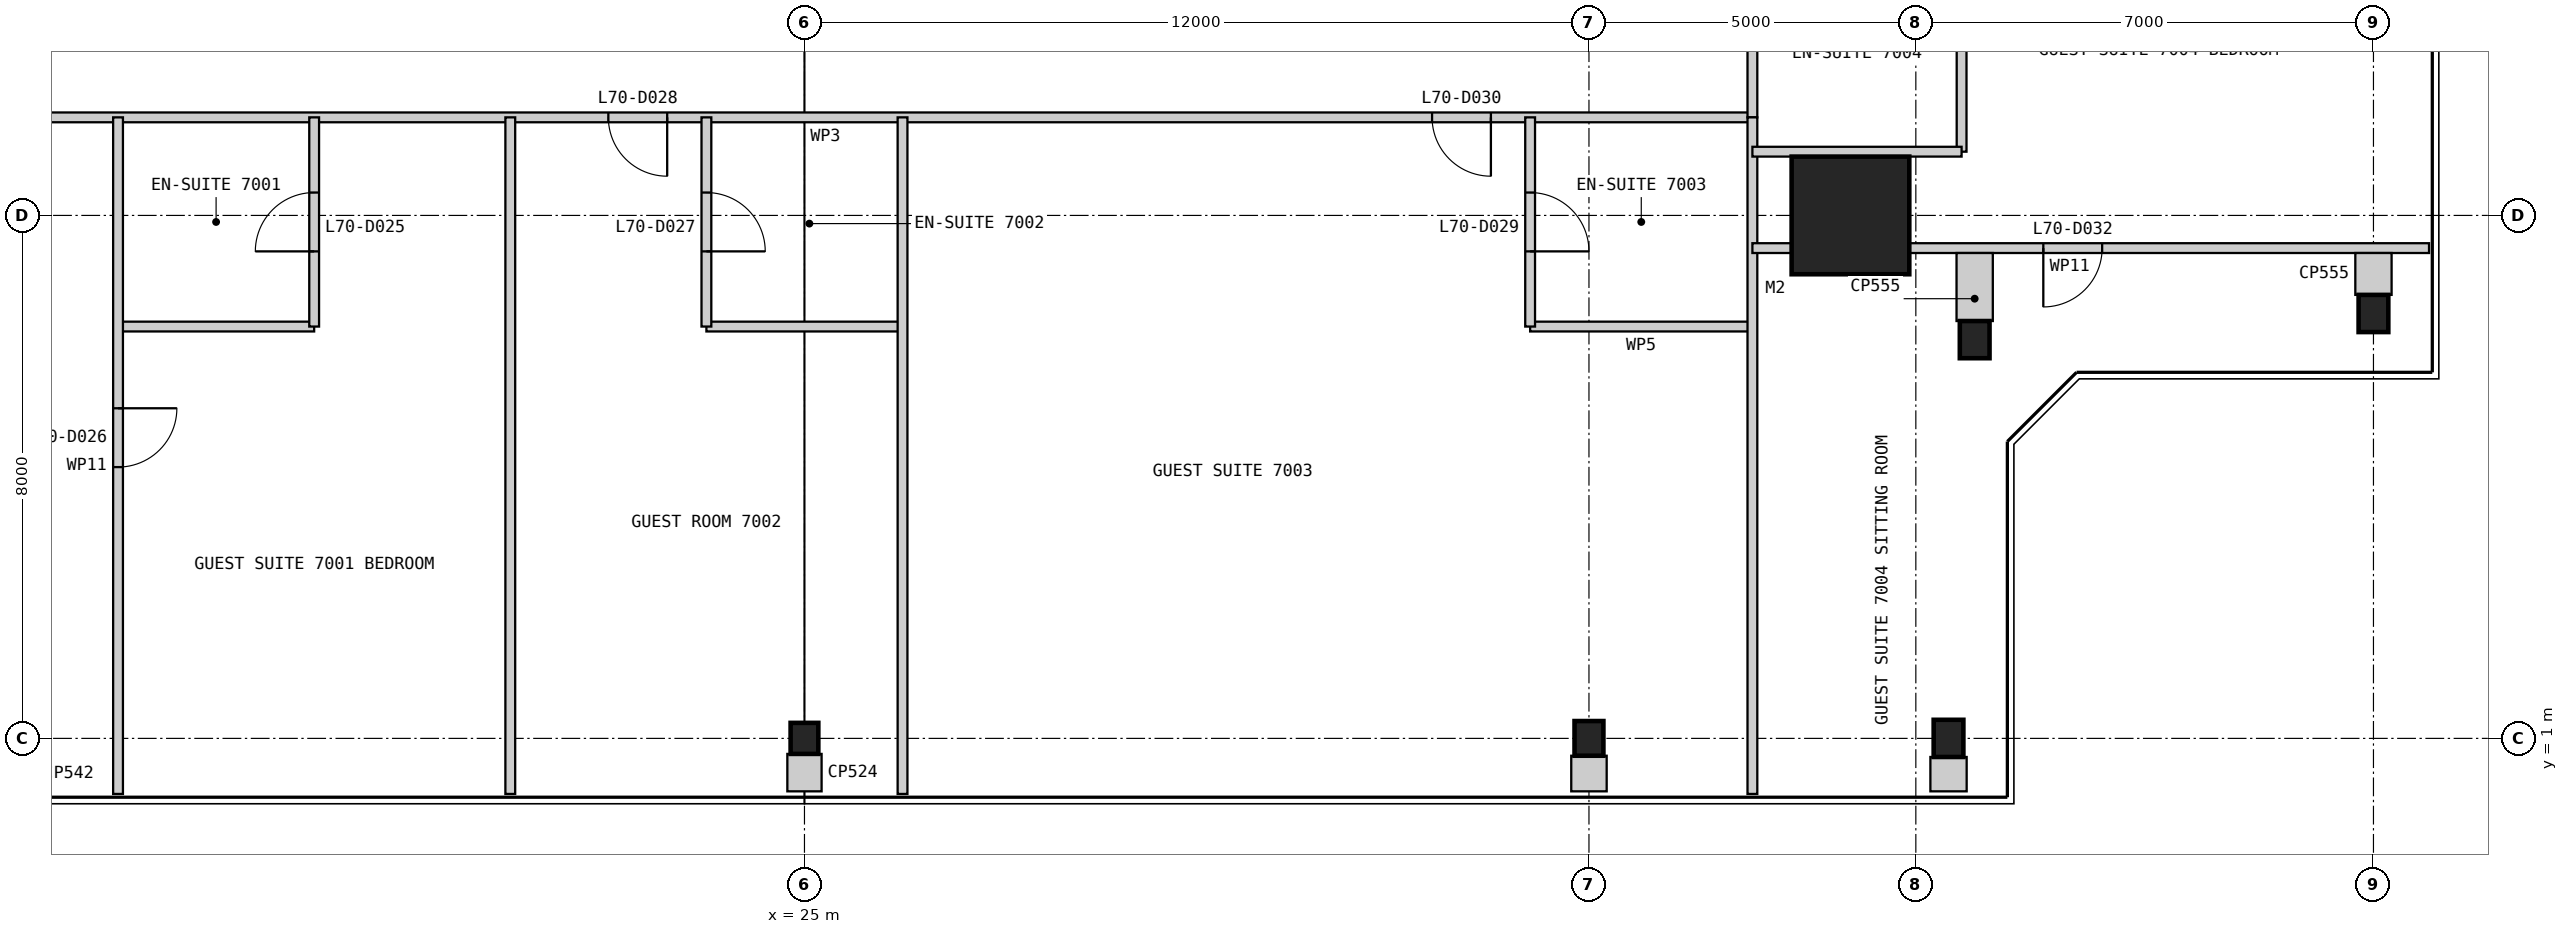
"""IFC4 building model, lengths in metres.
Left out: names, types, materials, properties, quantities, classifications, styles, units other than length and angle.
Written with IfcOpenShell. Run it as: python <this file> out.ifc"""

import sys

from ifc_helpers import new_model, si_unit, direction, frame, frame_2d, origin, origin_2d, place, context, subcontext, project, spatial, rectangle, i_section, extrude, element, fill, save


model = new_model("IFC4")
c1 = context("Model", 3, precision=1e-05, world=origin(), true_north=direction((0.0, 1.0)))
c2 = subcontext(c1, "Body", "Model", "MODEL_VIEW")
j1 = project(units=[si_unit("LENGTHUNIT", "METRE"), si_unit("PLANEANGLEUNIT", "RADIAN")], contexts=[c1])
p1 = place(None, origin())
s1 = spatial("IfcSite", under=j1, at=p1, CompositionType="ELEMENT")
p2 = place(p1, origin())
s2 = spatial("IfcBuilding", under=s1, at=p2, CompositionType="ELEMENT")
p3 = place(p2, frame((0.0, 0.0, 290.0)))
s3 = spatial("IfcBuildingStorey", under=s2, at=p3, CompositionType="ELEMENT", Elevation=290.0)
p4 = place(p3, frame((41.0, 9.0, 0.0), z_axis=(0.0, 0.0, 1.0), x_axis=(1.0, 0.0, 0.0)))
e1 = element("IfcColumn", 1, at=p4, inside=s3, PredefinedType="COLUMN", context=c2, shape_type="SweptSolid", body=[
    extrude(rectangle(XDim=1.8, YDim=1.8, at=origin_2d()), origin(), (0.0, 0.0, 1.0), 3.4),
])
p5 = place(p3, frame((25.0, 1.0, 0.0), z_axis=(0.0, 0.0, 1.0), x_axis=(1.0, 0.0, 0.0)))
e2 = element("IfcColumn", 2, at=p5, inside=s3, PredefinedType="COLUMN", context=c2, shape_type="SweptSolid", body=[
    extrude(i_section(OverallWidth=0.424, OverallDepth=0.475, WebThickness=0.048, FlangeThickness=0.077, at=origin_2d()), origin(), (0.0, 0.0, 1.0), 3.4),
])
p6 = place(p3, frame((37.0, 1.0, 0.0), z_axis=(0.0, 0.0, 1.0), x_axis=(1.0, 0.0, 0.0)))
e3 = element("IfcColumn", 3, at=p6, inside=s3, PredefinedType="COLUMN", context=c2, shape_type="SweptSolid", body=[
    extrude(i_section(OverallWidth=0.442, OverallDepth=0.531, WebThickness=0.066, FlangeThickness=0.106, at=origin_2d()), origin(), (0.0, 0.0, 1.0), 3.4),
])
for number, where, z_axis, x_axis in (
    (4, (42.5, 1.0, 0.0), (0.0, 0.0, 1.0), (1.0, 0.0, 0.0)),
    (5, (42.9, 7.1, 0.0), (0.0, 0.0, 1.0), (1.0, 0.0, 0.0)),
    (6, (49.0, 7.5, 0.0), (0.0, 0.0, 1.0), (1.0, 0.0, 0.0)),
):
    element("IfcColumn", number, at=place(p3, frame(where, z_axis=z_axis, x_axis=x_axis)), inside=s3, PredefinedType="COLUMN", context=c2, shape_type="SweptSolid", body=[
        extrude(i_section(OverallWidth=0.455, OverallDepth=0.569, WebThickness=0.078, FlangeThickness=0.125, at=origin_2d()), origin(), (0.0, 0.0, 1.0), 3.4),
    ])
p7 = place(p3, frame((10.5, 10.5, 0.0), z_axis=(0.0, 0.0, 1.0), x_axis=(1.0, 0.0, 0.0)))
e7 = element("IfcWall", 7, at=p7, inside=s3, PredefinedType="PARTITIONING", context=c2, shape_type="SweptSolid", body=[
    extrude(rectangle(XDim=29.0, YDim=0.15, at=frame_2d((14.5, 0.0))), origin(), (0.0, 0.0, 1.0), 3.25),
])
p8 = place(p7, frame((1.85, 0.0, 0.0)))
e8 = element("IfcOpeningElement", 8, at=p8, cuts=e7, PredefinedType="OPENING", context=c2, shape_type="SweptSolid", body=[
    extrude(rectangle(XDim=0.9, YDim=2.1, at=frame_2d((0.45, 1.05))), frame((0.0, 0.085, 0.0), z_axis=(0.0, -1.0, 0.0), x_axis=(1.0, 0.0, 0.0)), (0.0, 0.0, 1.0), 0.17),
])
p9 = place(p7, frame((11.5, 0.0, 0.0)))
e9 = element("IfcOpeningElement", 9, at=p9, cuts=e7, PredefinedType="OPENING", context=c2, shape_type="SweptSolid", body=[
    extrude(rectangle(XDim=0.9, YDim=2.1, at=frame_2d((0.45, 1.05))), frame((0.0, 0.085, 0.0), z_axis=(0.0, -1.0, 0.0), x_axis=(1.0, 0.0, 0.0)), (0.0, 0.0, 1.0), 0.17),
])
p10 = place(p7, frame((24.1, 0.0, 0.0)))
e10 = element("IfcOpeningElement", 10, at=p10, cuts=e7, PredefinedType="OPENING", context=c2, shape_type="SweptSolid", body=[
    extrude(rectangle(XDim=0.9, YDim=2.1, at=frame_2d((0.45, 1.05))), frame((0.0, 0.085, 0.0), z_axis=(0.0, -1.0, 0.0), x_axis=(1.0, 0.0, 0.0)), (0.0, 0.0, 1.0), 0.17),
])
p11 = place(p3, frame((14.5, 7.3, 0.0), z_axis=(0.0, 0.0, 1.0), x_axis=(1.0, 0.0, 0.0)))
e11 = element("IfcWall", 11, at=p11, inside=s3, PredefinedType="PARTITIONING", context=c2, shape_type="SweptSolid", body=[
    extrude(rectangle(XDim=3.0, YDim=0.15, at=frame_2d((1.5, 0.0))), origin(), (0.0, 0.0, 1.0), 3.25),
])
p12 = place(p3, frame((17.5, 7.3, 0.0), z_axis=(0.0, 0.0, 1.0), x_axis=(0.0, 1.0, 0.0)))
e12 = element("IfcWall", 12, at=p12, inside=s3, PredefinedType="PARTITIONING", context=c2, shape_type="SweptSolid", body=[
    extrude(rectangle(XDim=3.2, YDim=0.15, at=frame_2d((1.6, 0.0))), origin(), (0.0, 0.0, 1.0), 3.25),
])
p13 = place(p12, frame((1.15, 0.0, 0.0)))
e13 = element("IfcOpeningElement", 13, at=p13, cuts=e12, PredefinedType="OPENING", context=c2, shape_type="SweptSolid", body=[
    extrude(rectangle(XDim=0.9, YDim=2.1, at=frame_2d((0.45, 1.05))), frame((0.0, 0.085, 0.0), z_axis=(0.0, -1.0, 0.0), x_axis=(1.0, 0.0, 0.0)), (0.0, 0.0, 1.0), 0.17),
])
p14 = place(p3, frame((14.5, 0.15, 0.0), z_axis=(0.0, 0.0, 1.0), x_axis=(0.0, 1.0, 0.0)))
e14 = element("IfcWall", 14, at=p14, inside=s3, PredefinedType="PARTITIONING", context=c2, shape_type="SweptSolid", body=[
    extrude(rectangle(XDim=10.35, YDim=0.15, at=frame_2d((5.175, 0.0))), origin(), (0.0, 0.0, 1.0), 3.25),
])
p15 = place(p14, frame((5.0, 0.0, 0.0)))
e15 = element("IfcOpeningElement", 15, at=p15, cuts=e14, PredefinedType="OPENING", context=c2, shape_type="SweptSolid", body=[
    extrude(rectangle(XDim=0.9, YDim=2.1, at=frame_2d((0.45, 1.05))), frame((0.0, 0.085, 0.0), z_axis=(0.0, -1.0, 0.0), x_axis=(1.0, 0.0, 0.0)), (0.0, 0.0, 1.0), 0.17),
])
p16 = place(p3, frame((20.5, 0.15, 0.0), z_axis=(0.0, 0.0, 1.0), x_axis=(0.0, 1.0, 0.0)))
e16 = element("IfcWall", 16, at=p16, inside=s3, PredefinedType="PARTITIONING", context=c2, shape_type="SweptSolid", body=[
    extrude(rectangle(XDim=10.35, YDim=0.15, at=frame_2d((5.175, 0.0))), origin(), (0.0, 0.0, 1.0), 3.25),
])
p17 = place(p3, frame((23.5, 7.3, 0.0), z_axis=(0.0, 0.0, 1.0), x_axis=(1.0, 0.0, 0.0)))
e17 = element("IfcWall", 17, at=p17, inside=s3, PredefinedType="PARTITIONING", context=c2, shape_type="SweptSolid", body=[
    extrude(rectangle(XDim=3.0, YDim=0.15, at=frame_2d((1.5, 0.0))), origin(), (0.0, 0.0, 1.0), 3.25),
])
p18 = place(p3, frame((23.5, 7.3, 0.0), z_axis=(0.0, 0.0, 1.0), x_axis=(0.0, 1.0, 0.0)))
e18 = element("IfcWall", 18, at=p18, inside=s3, PredefinedType="PARTITIONING", context=c2, shape_type="SweptSolid", body=[
    extrude(rectangle(XDim=3.2, YDim=0.15, at=frame_2d((1.6, 0.0))), origin(), (0.0, 0.0, 1.0), 3.25),
])
p19 = place(p18, frame((1.15, 0.0, 0.0)))
e19 = element("IfcOpeningElement", 19, at=p19, cuts=e18, PredefinedType="OPENING", context=c2, shape_type="SweptSolid", body=[
    extrude(rectangle(XDim=0.9, YDim=2.1, at=frame_2d((0.45, 1.05))), frame((0.0, 0.085, 0.0), z_axis=(0.0, -1.0, 0.0), x_axis=(1.0, 0.0, 0.0)), (0.0, 0.0, 1.0), 0.17),
])
p20 = place(p3, frame((26.5, 0.15, 0.0), z_axis=(0.0, 0.0, 1.0), x_axis=(0.0, 1.0, 0.0)))
e20 = element("IfcWall", 20, at=p20, inside=s3, PredefinedType="PARTITIONING", context=c2, shape_type="SweptSolid", body=[
    extrude(rectangle(XDim=10.35, YDim=0.15, at=frame_2d((5.175, 0.0))), origin(), (0.0, 0.0, 1.0), 3.25),
])
p21 = place(p3, frame((36.1, 7.3, 0.0), z_axis=(0.0, 0.0, 1.0), x_axis=(1.0, 0.0, 0.0)))
e21 = element("IfcWall", 21, at=p21, inside=s3, PredefinedType="PARTITIONING", context=c2, shape_type="SweptSolid", body=[
    extrude(rectangle(XDim=3.4, YDim=0.15, at=frame_2d((1.7, 0.0))), origin(), (0.0, 0.0, 1.0), 3.25),
])
p22 = place(p3, frame((36.1, 7.3, 0.0), z_axis=(0.0, 0.0, 1.0), x_axis=(0.0, 1.0, 0.0)))
e22 = element("IfcWall", 22, at=p22, inside=s3, PredefinedType="PARTITIONING", context=c2, shape_type="SweptSolid", body=[
    extrude(rectangle(XDim=3.2, YDim=0.15, at=frame_2d((1.6, 0.0))), origin(), (0.0, 0.0, 1.0), 3.25),
])
p23 = place(p22, frame((1.15, 0.0, 0.0)))
e23 = element("IfcOpeningElement", 23, at=p23, cuts=e22, PredefinedType="OPENING", context=c2, shape_type="SweptSolid", body=[
    extrude(rectangle(XDim=0.9, YDim=2.1, at=frame_2d((0.45, 1.05))), frame((0.0, 0.085, 0.0), z_axis=(0.0, -1.0, 0.0), x_axis=(1.0, 0.0, 0.0)), (0.0, 0.0, 1.0), 0.17),
])
p24 = place(p3, frame((39.5, 10.5, 0.0), z_axis=(0.0, 0.0, 1.0), x_axis=(0.0, 1.0, 0.0)))
e24 = element("IfcWall", 24, at=p24, inside=s3, PredefinedType="PARTITIONING", context=c2, shape_type="SweptSolid", body=[
    extrude(rectangle(XDim=29.0, YDim=0.15, at=frame_2d((14.5, 0.0))), origin(), (0.0, 0.0, 1.0), 3.25),
])
p25 = place(p24, frame((2.775, 0.0, 0.0)))
e25 = element("IfcOpeningElement", 25, at=p25, cuts=e24, PredefinedType="OPENING", context=c2, shape_type="SweptSolid", body=[
    extrude(rectangle(XDim=0.9, YDim=2.1, at=frame_2d((0.45, 1.05))), frame((0.0, 0.085, 0.0), z_axis=(0.0, -1.0, 0.0), x_axis=(1.0, 0.0, 0.0)), (0.0, 0.0, 1.0), 0.17),
])
p26 = place(p24, frame((11.1, 0.0, 0.0)))
e26 = element("IfcOpeningElement", 26, at=p26, cuts=e24, PredefinedType="OPENING", context=c2, shape_type="SweptSolid", body=[
    extrude(rectangle(XDim=0.9, YDim=2.1, at=frame_2d((0.45, 1.05))), frame((0.0, 0.085, 0.0), z_axis=(0.0, -1.0, 0.0), x_axis=(1.0, 0.0, 0.0)), (0.0, 0.0, 1.0), 0.17),
])
p27 = place(p24, frame((17.2, 0.0, 0.0)))
e27 = element("IfcOpeningElement", 27, at=p27, cuts=e24, PredefinedType="OPENING", context=c2, shape_type="SweptSolid", body=[
    extrude(rectangle(XDim=1.0, YDim=2.1, at=frame_2d((0.5, 1.05))), frame((0.0, 0.085, 0.0), z_axis=(0.0, -1.0, 0.0), x_axis=(1.0, 0.0, 0.0)), (0.0, 0.0, 1.0), 0.17),
])
p28 = place(p24, frame((24.5, 0.0, 0.0)))
e28 = element("IfcOpeningElement", 28, at=p28, cuts=e24, PredefinedType="OPENING", context=c2, shape_type="SweptSolid", body=[
    extrude(rectangle(XDim=0.9, YDim=2.1, at=frame_2d((0.45, 1.05))), frame((0.0, 0.085, 0.0), z_axis=(0.0, -1.0, 0.0), x_axis=(1.0, 0.0, 0.0)), (0.0, 0.0, 1.0), 0.17),
])
p29 = place(p3, frame((39.5, 0.15, 0.0), z_axis=(0.0, 0.0, 1.0), x_axis=(0.0, 1.0, 0.0)))
e29 = element("IfcWall", 29, at=p29, inside=s3, PredefinedType="PARTITIONING", context=c2, shape_type="SweptSolid", body=[
    extrude(rectangle(XDim=10.35, YDim=0.15, at=frame_2d((5.175, 0.0))), origin(), (0.0, 0.0, 1.0), 3.25),
])
p30 = place(p3, frame((42.7, 9.975, 0.0), z_axis=(0.0, 0.0, 1.0), x_axis=(0.0, 1.0, 0.0)))
e30 = element("IfcWall", 30, at=p30, inside=s3, PredefinedType="PARTITIONING", context=c2, shape_type="SweptSolid", body=[
    extrude(rectangle(XDim=3.0, YDim=0.15, at=frame_2d((1.5, 0.0))), origin(), (0.0, 0.0, 1.0), 3.25),
])
p31 = place(p3, frame((42.7, 9.975, 0.0), z_axis=(0.0, 0.0, 1.0), x_axis=(-1.0, 0.0, 0.0)))
e31 = element("IfcWall", 31, at=p31, inside=s3, PredefinedType="PARTITIONING", context=c2, shape_type="SweptSolid", body=[
    extrude(rectangle(XDim=3.2, YDim=0.15, at=frame_2d((1.6, 0.0))), origin(), (0.0, 0.0, 1.0), 3.25),
])
p32 = place(p3, frame((49.85, 8.5, 0.0), z_axis=(0.0, 0.0, 1.0), x_axis=(-1.0, 0.0, 0.0)))
e32 = element("IfcWall", 32, at=p32, inside=s3, PredefinedType="PARTITIONING", context=c2, shape_type="SweptSolid", body=[
    extrude(rectangle(XDim=10.35, YDim=0.15, at=frame_2d((5.175, 0.0))), origin(), (0.0, 0.0, 1.0), 3.25),
])
p33 = place(p32, frame((5.0, 0.0, 0.0)))
e33 = element("IfcOpeningElement", 33, at=p33, cuts=e32, PredefinedType="OPENING", context=c2, shape_type="SweptSolid", body=[
    extrude(rectangle(XDim=0.9, YDim=2.1, at=frame_2d((0.45, 1.05))), frame((0.0, 0.085, 0.0), z_axis=(0.0, -1.0, 0.0), x_axis=(1.0, 0.0, 0.0)), (0.0, 0.0, 1.0), 0.17),
])
p34 = place(p3, frame((25.0, 0.19, 0.0), z_axis=(0.0, 0.0, 1.0), x_axis=(0.0, 1.0, 0.0)))
e34 = element("IfcWall", 34, at=p34, inside=s3, PredefinedType="PARTITIONING", context=c2, shape_type="SweptSolid", body=[
    extrude(rectangle(XDim=0.573, YDim=0.524, at=frame_2d((0.286, 0.0))), origin(), (0.0, 0.0, 1.0), 3.25),
])
p35 = place(p3, frame((37.0, 0.19, 0.0), z_axis=(0.0, 0.0, 1.0), x_axis=(0.0, 1.0, 0.0)))
e35 = element("IfcWall", 35, at=p35, inside=s3, PredefinedType="PARTITIONING", context=c2, shape_type="SweptSolid", body=[
    extrude(rectangle(XDim=0.545, YDim=0.542, at=frame_2d((0.272, 0.0))), origin(), (0.0, 0.0, 1.0), 3.25),
])
p36 = place(p3, frame((42.5, 0.19, 0.0), z_axis=(0.0, 0.0, 1.0), x_axis=(0.0, 1.0, 0.0)))
e36 = element("IfcWall", 36, at=p36, inside=s3, PredefinedType="PARTITIONING", context=c2, shape_type="SweptSolid", body=[
    extrude(rectangle(XDim=0.526, YDim=0.555, at=frame_2d((0.263, 0.0))), origin(), (0.0, 0.0, 1.0), 3.25),
])
p37 = place(p3, frame((42.9, 8.425, 0.0), z_axis=(0.0, 0.0, 1.0), x_axis=(0.0, -1.0, 0.0)))
e37 = element("IfcWall", 37, at=p37, inside=s3, PredefinedType="PARTITIONING", context=c2, shape_type="SweptSolid", body=[
    extrude(rectangle(XDim=1.041, YDim=0.555, at=frame_2d((0.52, 0.0))), origin(), (0.0, 0.0, 1.0), 3.25),
])
p38 = place(p3, frame((49.0, 8.425, 0.0), z_axis=(0.0, 0.0, 1.0), x_axis=(0.0, -1.0, 0.0)))
e38 = element("IfcWall", 38, at=p38, inside=s3, PredefinedType="PARTITIONING", context=c2, shape_type="SweptSolid", body=[
    extrude(rectangle(XDim=0.641, YDim=0.555, at=frame_2d((0.32, 0.0))), origin(), (0.0, 0.0, 1.0), 2.338),
])
p39 = place(p13, origin())
e39 = element("IfcDoor", 39, at=p39, inside=s3, OperationType="SINGLE_SWING_LEFT", PredefinedType="DOOR", context=c2, shape_type="SweptSolid", body=[
    extrude(rectangle(XDim=0.9, YDim=2.1, at=frame_2d((0.45, 1.05))), frame((0.0, 0.025, 0.0), z_axis=(0.0, -1.0, 0.0), x_axis=(1.0, 0.0, 0.0)), (0.0, 0.0, 1.0), 0.05),
])
fill(e13, e39)
p40 = place(p15, frame((0.9, 0.0, 0.0), z_axis=(0.0, 0.0, 1.0), x_axis=(-1.0, 0.0, 0.0)))
e40 = element("IfcDoor", 40, at=p40, inside=s3, OperationType="SINGLE_SWING_LEFT", PredefinedType="DOOR", context=c2, shape_type="SweptSolid", body=[
    extrude(rectangle(XDim=0.9, YDim=2.1, at=frame_2d((0.45, 1.05))), frame((0.0, 0.025, 0.0), z_axis=(0.0, -1.0, 0.0), x_axis=(1.0, 0.0, 0.0)), (0.0, 0.0, 1.0), 0.05),
])
fill(e15, e40)
p41 = place(p19, frame((0.9, 0.0, 0.0), z_axis=(0.0, 0.0, 1.0), x_axis=(-1.0, 0.0, 0.0)))
e41 = element("IfcDoor", 41, at=p41, inside=s3, OperationType="SINGLE_SWING_RIGHT", PredefinedType="DOOR", context=c2, shape_type="SweptSolid", body=[
    extrude(rectangle(XDim=0.9, YDim=2.1, at=frame_2d((0.45, 1.05))), frame((0.0, 0.025, 0.0), z_axis=(0.0, -1.0, 0.0), x_axis=(1.0, 0.0, 0.0)), (0.0, 0.0, 1.0), 0.05),
])
fill(e19, e41)
p42 = place(p9, frame((0.9, 0.0, 0.0), z_axis=(0.0, 0.0, 1.0), x_axis=(-1.0, 0.0, 0.0)))
e42 = element("IfcDoor", 42, at=p42, inside=s3, OperationType="SINGLE_SWING_LEFT", PredefinedType="DOOR", context=c2, shape_type="SweptSolid", body=[
    extrude(rectangle(XDim=0.9, YDim=2.1, at=frame_2d((0.45, 1.05))), frame((0.0, 0.025, 0.0), z_axis=(0.0, -1.0, 0.0), x_axis=(1.0, 0.0, 0.0)), (0.0, 0.0, 1.0), 0.05),
])
fill(e9, e42)
p43 = place(p23, frame((0.9, 0.0, 0.0), z_axis=(0.0, 0.0, 1.0), x_axis=(-1.0, 0.0, 0.0)))
e43 = element("IfcDoor", 43, at=p43, inside=s3, OperationType="SINGLE_SWING_RIGHT", PredefinedType="DOOR", context=c2, shape_type="SweptSolid", body=[
    extrude(rectangle(XDim=0.9, YDim=2.1, at=frame_2d((0.45, 1.05))), frame((0.0, 0.025, 0.0), z_axis=(0.0, -1.0, 0.0), x_axis=(1.0, 0.0, 0.0)), (0.0, 0.0, 1.0), 0.05),
])
fill(e23, e43)
p44 = place(p10, frame((0.9, 0.0, 0.0), z_axis=(0.0, 0.0, 1.0), x_axis=(-1.0, 0.0, 0.0)))
e44 = element("IfcDoor", 44, at=p44, inside=s3, OperationType="SINGLE_SWING_LEFT", PredefinedType="DOOR", context=c2, shape_type="SweptSolid", body=[
    extrude(rectangle(XDim=0.9, YDim=2.1, at=frame_2d((0.45, 1.05))), frame((0.0, 0.025, 0.0), z_axis=(0.0, -1.0, 0.0), x_axis=(1.0, 0.0, 0.0)), (0.0, 0.0, 1.0), 0.05),
])
fill(e10, e44)
p45 = place(p33, origin())
e45 = element("IfcDoor", 45, at=p45, inside=s3, OperationType="SINGLE_SWING_RIGHT", PredefinedType="DOOR", context=c2, shape_type="SweptSolid", body=[
    extrude(rectangle(XDim=0.9, YDim=2.1, at=frame_2d((0.45, 1.05))), frame((0.0, 0.025, 0.0), z_axis=(0.0, -1.0, 0.0), x_axis=(1.0, 0.0, 0.0)), (0.0, 0.0, 1.0), 0.05),
])
fill(e33, e45)
save(model, sys.argv[1])
